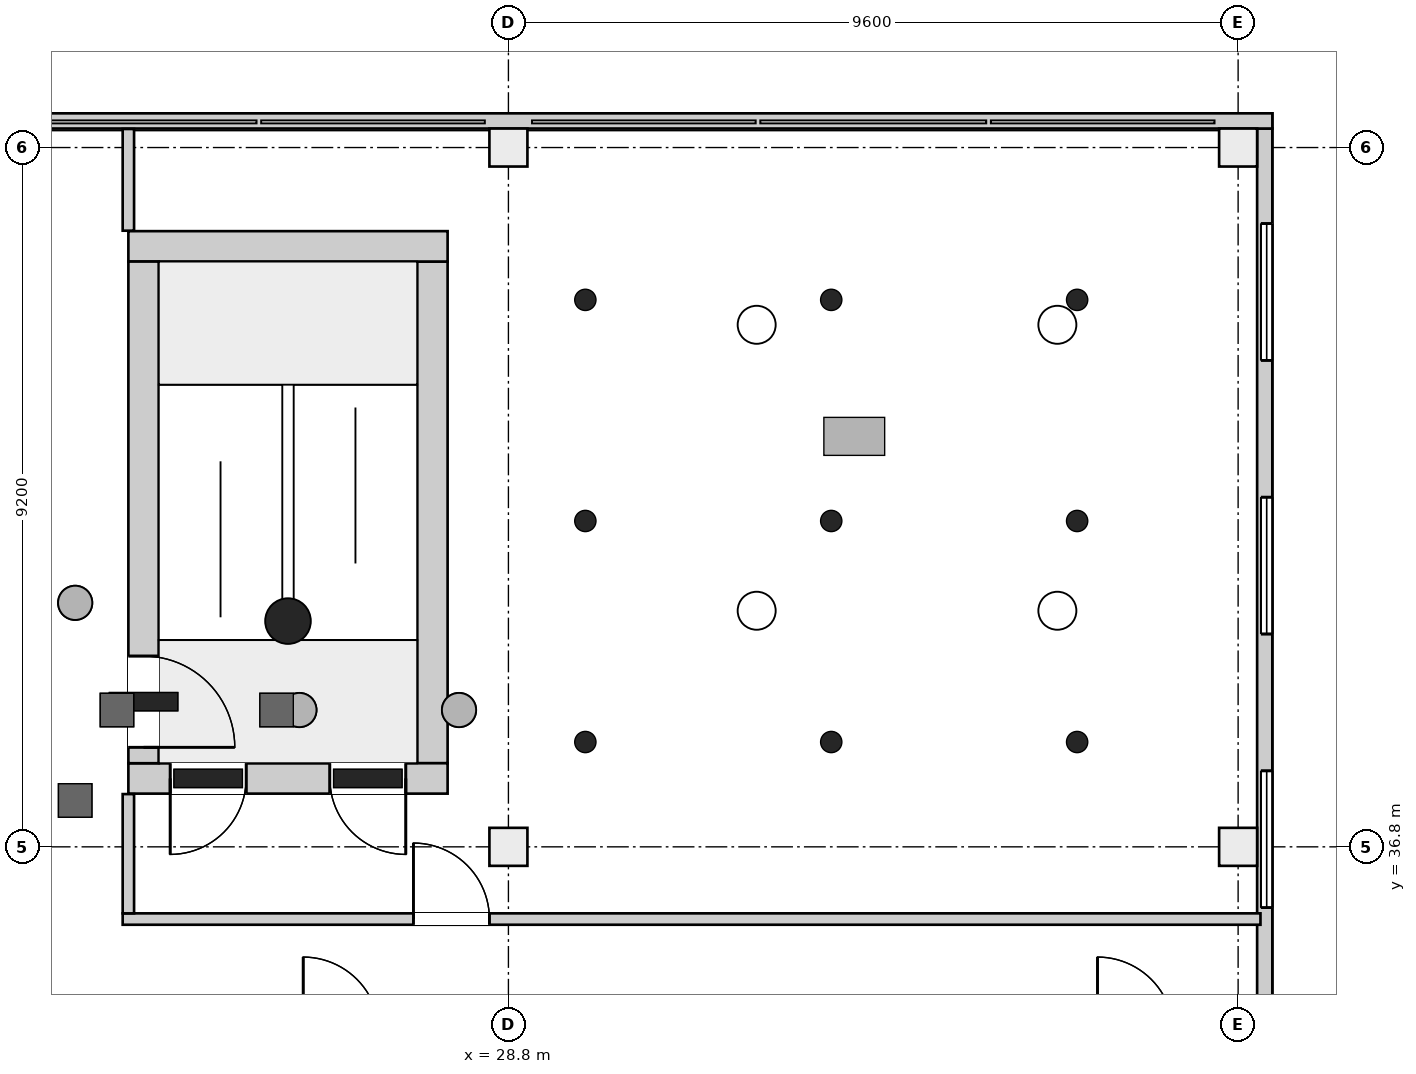
"""IFC4 building model, lengths in metres.
Left out: names, types, materials, properties, quantities, classifications, styles, units other than length and angle.
Written with IfcOpenShell. Run it as: python <this file> out.ifc"""

import sys

from ifc_helpers import new_model, si_unit, direction, frame, frame_2d, origin, origin_2d, place, context, subcontext, project, spatial, rectangle, extrude, element, fill, save


model = new_model("IFC4")
c1 = context("Model", 3, precision=1e-05, world=origin(), true_north=direction((0.0, 1.0)))
c2 = subcontext(c1, "Body", "Model", "MODEL_VIEW")
j1 = project(units=[si_unit("LENGTHUNIT", "METRE"), si_unit("PLANEANGLEUNIT", "RADIAN")], contexts=[c1])
p1 = place(None, origin())
s1 = spatial("IfcSite", under=j1, at=p1, CompositionType="ELEMENT")
p2 = place(p1, origin())
s2 = spatial("IfcBuilding", under=s1, at=p2, CompositionType="ELEMENT")
p3 = place(p2, frame((0.0, 0.0, 78.1)))
s3 = spatial("IfcBuildingStorey", under=s2, at=p3, CompositionType="ELEMENT", Elevation=78.1)
p4 = place(p3, frame((23.8, 37.7, 0.0), z_axis=(0.0, 0.0, 1.0), x_axis=(1.0, 0.0, 0.0)))
e1 = element("IfcWall", 1, at=p4, inside=s3, PredefinedType="SHEAR", context=c2, shape_type="SweptSolid", body=[
    extrude(rectangle(XDim=4.2, YDim=0.4, at=frame_2d((2.1, 0.0))), origin(), (0.0, 0.0, 1.0), 7.1),
])
p5 = place(p4, frame((0.55, 0.0, 4.2)))
e2 = element("IfcOpeningElement", 2, at=p5, cuts=e1, PredefinedType="OPENING", context=c2, shape_type="SweptSolid", body=[
    extrude(rectangle(XDim=1.0, YDim=2.1, at=frame_2d((0.5, 1.05))), frame((0.0, 0.21, 0.0), z_axis=(0.0, -1.0, 0.0), x_axis=(1.0, 0.0, 0.0)), (0.0, 0.0, 1.0), 0.42),
])
p6 = place(p4, frame((2.65, 0.0, 4.2)))
e3 = element("IfcOpeningElement", 3, at=p6, cuts=e1, PredefinedType="OPENING", context=c2, shape_type="SweptSolid", body=[
    extrude(rectangle(XDim=1.0, YDim=2.1, at=frame_2d((0.5, 1.05))), frame((0.0, 0.21, 0.0), z_axis=(0.0, -1.0, 0.0), x_axis=(1.0, 0.0, 0.0)), (0.0, 0.0, 1.0), 0.42),
])
p7 = place(p3, frame((23.8, 44.7, 0.0), z_axis=(0.0, 0.0, 1.0), x_axis=(1.0, 0.0, 0.0)))
e4 = element("IfcWall", 4, at=p7, inside=s3, PredefinedType="SHEAR", context=c2, shape_type="SweptSolid", body=[
    extrude(rectangle(XDim=4.2, YDim=0.4, at=frame_2d((2.1, 0.0))), origin(), (0.0, 0.0, 1.0), 7.1),
])
p8 = place(p3, frame((24.0, 37.9, 0.0), z_axis=(0.0, 0.0, 1.0), x_axis=(0.0, 1.0, 0.0)))
e5 = element("IfcWall", 5, at=p8, inside=s3, PredefinedType="SHEAR", context=c2, shape_type="SweptSolid", body=[
    extrude(rectangle(XDim=6.6, YDim=0.4, at=frame_2d((3.3, 0.0))), origin(), (0.0, 0.0, 1.0), 7.1),
])
p9 = place(p8, frame((0.21, 0.0, 0.0)))
e6 = element("IfcOpeningElement", 6, at=p9, cuts=e5, PredefinedType="OPENING", context=c2, shape_type="SweptSolid", body=[
    extrude(rectangle(XDim=1.2, YDim=2.1, at=frame_2d((0.6, 1.05))), frame((0.0, 0.21, 0.0), z_axis=(0.0, -1.0, 0.0), x_axis=(1.0, 0.0, 0.0)), (0.0, 0.0, 1.0), 0.42),
])
p10 = place(p3, frame((27.8, 37.9, 0.0), z_axis=(0.0, 0.0, 1.0), x_axis=(0.0, 1.0, 0.0)))
e7 = element("IfcWall", 7, at=p10, inside=s3, PredefinedType="SHEAR", context=c2, shape_type="SweptSolid", body=[
    extrude(rectangle(XDim=6.6, YDim=0.4, at=frame_2d((3.3, 0.0))), origin(), (0.0, 0.0, 1.0), 7.1),
])
for number, where, z_axis, x_axis in (
    (8, (28.8, 36.8, 0.0), (0.0, 0.0, 1.0), (1.0, 0.0, 0.0)),
    (9, (38.4, 36.8, 0.0), (0.0, 0.0, 1.0), (1.0, 0.0, 0.0)),
    (10, (28.8, 46.0, 0.0), (0.0, 0.0, 1.0), (1.0, 0.0, 0.0)),
    (11, (38.4, 46.0, 0.0), (0.0, 0.0, 1.0), (1.0, 0.0, 0.0)),
):
    element("IfcColumn", number, at=place(p3, frame(where, z_axis=z_axis, x_axis=x_axis)), inside=s3, PredefinedType="COLUMN", context=c2, shape_type="SweptSolid", body=[
        extrude(rectangle(XDim=0.5, YDim=0.5, at=origin_2d()), origin(), (0.0, 0.0, 1.0), 3.9),
    ])
p11 = place(p3, frame((38.775, 27.15, 0.0), z_axis=(0.0, 0.0, 1.0), x_axis=(0.0, 1.0, 0.0)))
e12 = element("IfcWall", 12, at=p11, inside=s3, PredefinedType="ELEMENTEDWALL", context=c2, shape_type="SweptSolid", body=[
    extrude(rectangle(XDim=19.3, YDim=0.15, at=frame_2d((9.65, 0.0))), origin(), (0.0, 0.0, 1.0), 3.9),
])
p12 = place(p11, frame((1.65, 0.0, 0.9)))
e13 = element("IfcOpeningElement", 13, at=p12, cuts=e12, PredefinedType="OPENING", context=c2, shape_type="SweptSolid", body=[
    extrude(rectangle(XDim=1.8, YDim=2.6, at=frame_2d((0.9, 1.3))), frame((0.0, 0.085, 0.0), z_axis=(0.0, -1.0, 0.0), x_axis=(1.0, 0.0, 0.0)), (0.0, 0.0, 1.0), 0.17),
])
p13 = place(p11, frame((5.25, 0.0, 0.9)))
e14 = element("IfcOpeningElement", 14, at=p13, cuts=e12, PredefinedType="OPENING", context=c2, shape_type="SweptSolid", body=[
    extrude(rectangle(XDim=1.8, YDim=2.6, at=frame_2d((0.9, 1.3))), frame((0.0, 0.085, 0.0), z_axis=(0.0, -1.0, 0.0), x_axis=(1.0, 0.0, 0.0)), (0.0, 0.0, 1.0), 0.17),
])
p14 = place(p11, frame((8.85, 0.0, 0.9)))
e15 = element("IfcOpeningElement", 15, at=p14, cuts=e12, PredefinedType="OPENING", context=c2, shape_type="SweptSolid", body=[
    extrude(rectangle(XDim=1.8, YDim=2.6, at=frame_2d((0.9, 1.3))), frame((0.0, 0.085, 0.0), z_axis=(0.0, -1.0, 0.0), x_axis=(1.0, 0.0, 0.0)), (0.0, 0.0, 1.0), 0.17),
])
p15 = place(p11, frame((12.45, 0.0, 0.9)))
e16 = element("IfcOpeningElement", 16, at=p15, cuts=e12, PredefinedType="OPENING", context=c2, shape_type="SweptSolid", body=[
    extrude(rectangle(XDim=1.8, YDim=2.6, at=frame_2d((0.9, 1.3))), frame((0.0, 0.085, 0.0), z_axis=(0.0, -1.0, 0.0), x_axis=(1.0, 0.0, 0.0)), (0.0, 0.0, 1.0), 0.17),
])
p16 = place(p11, frame((16.05, 0.0, 0.9)))
e17 = element("IfcOpeningElement", 17, at=p16, cuts=e12, PredefinedType="OPENING", context=c2, shape_type="SweptSolid", body=[
    extrude(rectangle(XDim=1.8, YDim=2.6, at=frame_2d((0.9, 1.3))), frame((0.0, 0.085, 0.0), z_axis=(0.0, -1.0, 0.0), x_axis=(1.0, 0.0, 0.0)), (0.0, 0.0, 1.0), 0.17),
])
p17 = place(p3, frame((38.851, 46.35, 4.2), z_axis=(0.0, 0.0, 1.0), x_axis=(-1.0, 0.0, 0.0)))
e18 = element("IfcWall", 18, at=p17, inside=s3, PredefinedType="PARAPET", context=c2, shape_type="SweptSolid", body=[
    extrude(rectangle(XDim=39.05, YDim=0.2, at=frame_2d((19.525, 0.0))), origin(), (0.0, 0.0, 1.0), 1.1),
])
p18 = place(p3, frame((38.75, 27.35, 4.2), z_axis=(0.0, 0.0, 1.0), x_axis=(0.0, 1.0, 0.0)))
e19 = element("IfcWall", 19, at=p18, inside=s3, PredefinedType="PARAPET", context=c2, shape_type="SweptSolid", body=[
    extrude(rectangle(XDim=18.9, YDim=0.2, at=frame_2d((9.45, 0.0))), origin(), (0.0, 0.0, 1.0), 1.1),
])
p19 = place(p3, frame((23.725, 35.85, 0.0), z_axis=(0.0, 0.0, 1.0), x_axis=(1.0, 0.0, 0.0)))
e20 = element("IfcWall", 20, at=p19, inside=s3, PredefinedType="PARTITIONING", context=c2, shape_type="SweptSolid", body=[
    extrude(rectangle(XDim=14.969, YDim=0.15, at=frame_2d((7.484, 0.0))), origin(), (0.0, 0.0, 1.0), 3.9),
])
p20 = place(p19, frame((3.825, 0.0, 0.0)))
e21 = element("IfcOpeningElement", 21, at=p20, cuts=e20, PredefinedType="OPENING", context=c2, shape_type="SweptSolid", body=[
    extrude(rectangle(XDim=1.0, YDim=2.1, at=frame_2d((0.5, 1.05))), frame((0.0, 0.085, 0.0), z_axis=(0.0, -1.0, 0.0), x_axis=(1.0, 0.0, 0.0)), (0.0, 0.0, 1.0), 0.17),
])
p21 = place(p3, frame((23.8, 35.925, 0.0), z_axis=(0.0, 0.0, 1.0), x_axis=(0.0, 1.0, 0.0)))
e22 = element("IfcWall", 22, at=p21, inside=s3, PredefinedType="PARTITIONING", context=c2, shape_type="SweptSolid", body=[
    extrude(rectangle(XDim=1.569, YDim=0.15, at=frame_2d((0.784, 0.0))), origin(), (0.0, 0.0, 1.0), 3.9),
])
p22 = place(p3, frame((23.8, 44.906, 0.0), z_axis=(0.0, 0.0, 1.0), x_axis=(0.0, 1.0, 0.0)))
e23 = element("IfcWall", 23, at=p22, inside=s3, PredefinedType="PARTITIONING", context=c2, shape_type="SweptSolid", body=[
    extrude(rectangle(XDim=1.338, YDim=0.15, at=frame_2d((0.669, 0.0))), origin(), (0.0, 0.0, 1.0), 3.9),
])
p23 = place(p14, origin())
e24 = element("IfcWindow", 24, at=p23, inside=s3, PartitioningType="SINGLE_PANEL", PredefinedType="WINDOW", context=c2, shape_type="SweptSolid", body=[
    extrude(rectangle(XDim=1.8, YDim=2.6, at=frame_2d((0.9, 1.3))), frame((0.0, 0.03, 0.0), z_axis=(0.0, -1.0, 0.0), x_axis=(1.0, 0.0, 0.0)), (0.0, 0.0, 1.0), 0.06),
])
fill(e15, e24)
p24 = place(p15, origin())
e25 = element("IfcWindow", 25, at=p24, inside=s3, PartitioningType="SINGLE_PANEL", PredefinedType="WINDOW", context=c2, shape_type="SweptSolid", body=[
    extrude(rectangle(XDim=1.8, YDim=2.6, at=frame_2d((0.9, 1.3))), frame((0.0, 0.03, 0.0), z_axis=(0.0, -1.0, 0.0), x_axis=(1.0, 0.0, 0.0)), (0.0, 0.0, 1.0), 0.06),
])
fill(e16, e25)
p25 = place(p16, origin())
e26 = element("IfcWindow", 26, at=p25, inside=s3, PartitioningType="SINGLE_PANEL", PredefinedType="WINDOW", context=c2, shape_type="SweptSolid", body=[
    extrude(rectangle(XDim=1.8, YDim=2.6, at=frame_2d((0.9, 1.3))), frame((0.0, 0.03, 0.0), z_axis=(0.0, -1.0, 0.0), x_axis=(1.0, 0.0, 0.0)), (0.0, 0.0, 1.0), 0.06),
])
fill(e17, e26)
p26 = place(p9, origin())
e27 = element("IfcDoor", 27, at=p26, inside=s3, OperationType="SINGLE_SWING_LEFT", PredefinedType="DOOR", context=c2, shape_type="SweptSolid", body=[
    extrude(rectangle(XDim=1.2, YDim=2.1, at=frame_2d((0.6, 1.05))), frame((0.0, 0.025, 0.0), z_axis=(0.0, -1.0, 0.0), x_axis=(1.0, 0.0, 0.0)), (0.0, 0.0, 1.0), 0.05),
])
fill(e6, e27)
p27 = place(p5, frame((1.0, 0.0, 0.0), z_axis=(0.0, 0.0, 1.0), x_axis=(-1.0, 0.0, 0.0)))
e28 = element("IfcDoor", 28, at=p27, inside=s3, OperationType="SINGLE_SWING_LEFT", PredefinedType="DOOR", context=c2, shape_type="SweptSolid", body=[
    extrude(rectangle(XDim=1.0, YDim=2.1, at=frame_2d((0.5, 1.05))), frame((0.0, 0.025, 0.0), z_axis=(0.0, -1.0, 0.0), x_axis=(1.0, 0.0, 0.0)), (0.0, 0.0, 1.0), 0.05),
])
fill(e2, e28)
p28 = place(p6, frame((1.0, 0.0, 0.0), z_axis=(0.0, 0.0, 1.0), x_axis=(-1.0, 0.0, 0.0)))
e29 = element("IfcDoor", 29, at=p28, inside=s3, OperationType="SINGLE_SWING_RIGHT", PredefinedType="DOOR", context=c2, shape_type="SweptSolid", body=[
    extrude(rectangle(XDim=1.0, YDim=2.1, at=frame_2d((0.5, 1.05))), frame((0.0, 0.025, 0.0), z_axis=(0.0, -1.0, 0.0), x_axis=(1.0, 0.0, 0.0)), (0.0, 0.0, 1.0), 0.05),
])
fill(e3, e29)
p29 = place(p20, origin())
e30 = element("IfcDoor", 30, at=p29, inside=s3, OperationType="SINGLE_SWING_RIGHT", PredefinedType="DOOR", context=c2, shape_type="SweptSolid", body=[
    extrude(rectangle(XDim=1.0, YDim=2.1, at=frame_2d((0.5, 1.05))), frame((0.0, 0.025, 0.0), z_axis=(0.0, -1.0, 0.0), x_axis=(1.0, 0.0, 0.0)), (0.0, 0.0, 1.0), 0.05),
])
fill(e21, e30)
save(model, sys.argv[1])
